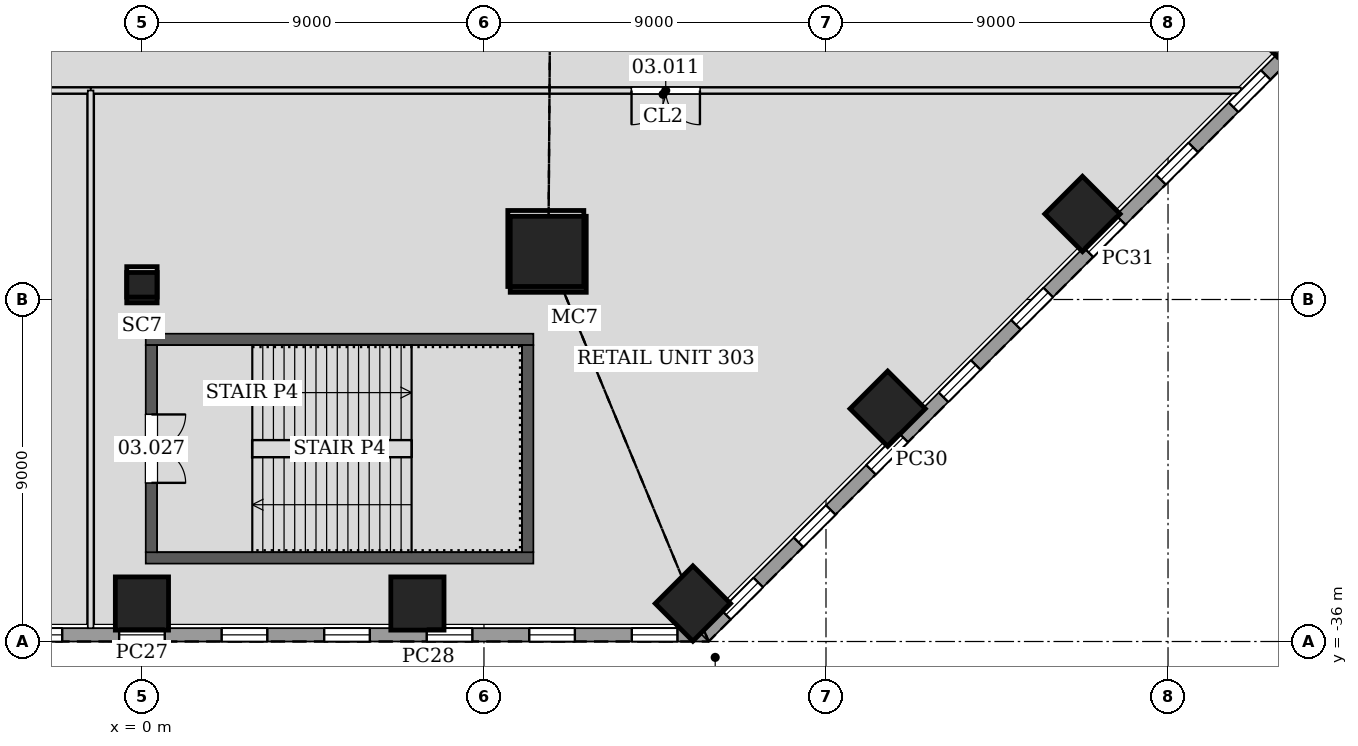
"""IFC4 building model, lengths in metres.
Left out: names, types, materials, properties, quantities, classifications, styles, units other than length and angle.
Written with IfcOpenShell. Run it as: python <this file> out.ifc"""

import sys

from ifc_helpers import new_model, si_unit, direction, frame, frame_2d, origin, origin_2d, place, context, subcontext, project, spatial, rectangle, hollow_rectangle, extrude, element, fill, save


model = new_model("IFC4")
c1 = context("Model", 3, precision=1e-05, world=origin(), true_north=direction((0.0, 1.0)))
c2 = subcontext(c1, "Body", "Model", "MODEL_VIEW")
j1 = project(units=[si_unit("LENGTHUNIT", "METRE"), si_unit("PLANEANGLEUNIT", "RADIAN")], contexts=[c1])
p1 = place(None, origin())
s1 = spatial("IfcSite", under=j1, at=p1, CompositionType="ELEMENT")
p2 = place(p1, origin())
s2 = spatial("IfcBuilding", under=s1, at=p2, CompositionType="ELEMENT")
p3 = place(p2, frame((0.0, 0.0, 18.6)))
s3 = spatial("IfcBuildingStorey", under=s2, at=p3, CompositionType="ELEMENT", Elevation=18.6)
p4 = place(p3, frame((10.691, -25.81, 0.0), z_axis=(-0.011704430453, 0.028289472832, 0.999531246152), x_axis=(-0.92403481427, -0.3823083337, 0.0)))
e1 = element("IfcColumn", 1, at=p4, inside=s3, PredefinedType="COLUMN", context=c2, shape_type="SweptSolid", body=[
    extrude(hollow_rectangle(XDim=2.0, YDim=2.0, WallThickness=0.09, at=origin_2d()), origin(), (0.0, 0.0, 1.0), 5.402),
])
p5 = place(p3, frame((0.0, -26.688, 0.0), z_axis=(0.0, 0.02824625291, 0.999600994996), x_axis=(-1.0, 0.0, 0.0)))
e2 = element("IfcColumn", 2, at=p5, inside=s3, PredefinedType="COLUMN", context=c2, shape_type="SweptSolid", body=[
    extrude(hollow_rectangle(XDim=0.8, YDim=0.8, WallThickness=0.05, at=origin_2d()), origin(), (0.0, 0.0, 1.0), 5.402),
])
for number, where, z_axis, x_axis in (
    (3, (0.0, -35.0, 0.0), (0.0, 0.0, 1.0), (1.0, 0.0, 0.0)),
    (4, (7.249, -35.0, 0.0), (0.0, 0.0, 1.0), (1.0, 0.0, 0.0)),
    (5, (14.498, -35.0, 0.0), (0.0, 0.0, 1.0), (0.707, 0.707, 0.0)),
    (6, (19.623, -29.874, 0.0), (0.0, 0.0, 1.0), (0.707, 0.707, 0.0)),
    (7, (24.749, -24.749, 0.0), (0.0, 0.0, 1.0), (0.707, 0.707, 0.0)),
    (8, (29.874, -19.623, 0.0), (0.0, 0.0, 1.0), (0.707, 0.707, 0.0)),
):
    element("IfcColumn", number, at=place(p3, frame(where, z_axis=z_axis, x_axis=x_axis)), inside=s3, PredefinedType="COLUMN", context=c2, shape_type="SweptSolid", body=[
        extrude(rectangle(XDim=1.4, YDim=1.4, at=origin_2d()), origin(), (0.0, 0.0, 1.0), 5.4),
    ])
for number, where, z_axis, x_axis in (
    (9, (0.1, -33.8, 0.0), (0.0, 0.0, 1.0), (1.0, 0.0, 0.0)),
    (10, (10.3, -28.05, 0.0), (0.0, 0.0, 1.0), (-1.0, 0.0, 0.0)),
):
    element("IfcWall", number, at=place(p3, frame(where, z_axis=z_axis, x_axis=x_axis)), inside=s3, PredefinedType="SOLIDWALL", context=c2, shape_type="SweptSolid", body=[
        extrude(rectangle(XDim=10.2, YDim=0.3, at=frame_2d((5.1, 0.0))), origin(), (0.0, 0.0, 1.0), 5.4),
    ])
p6 = place(p3, frame((0.25, -28.2, 0.0), z_axis=(0.0, 0.0, 1.0), x_axis=(0.0, -1.0, 0.0)))
e11 = element("IfcWall", 11, at=p6, inside=s3, PredefinedType="SOLIDWALL", context=c2, shape_type="SweptSolid", body=[
    extrude(rectangle(XDim=5.45, YDim=0.3, at=frame_2d((2.725, 0.0))), origin(), (0.0, 0.0, 1.0), 5.4),
])
p7 = place(p6, frame((1.825, 0.0, 0.0)))
e12 = element("IfcOpeningElement", 12, at=p7, cuts=e11, PredefinedType="OPENING", context=c2, shape_type="SweptSolid", body=[
    extrude(rectangle(XDim=1.8, YDim=2.1, at=frame_2d((0.9, 1.05))), frame((0.0, 0.16, 0.0), z_axis=(0.0, -1.0, 0.0), x_axis=(1.0, 0.0, 0.0)), (0.0, 0.0, 1.0), 0.32),
])
p8 = place(p3, frame((10.15, -33.65, 0.0), z_axis=(0.0, 0.0, 1.0), x_axis=(0.0, 1.0, 0.0)))
e13 = element("IfcWall", 13, at=p8, inside=s3, PredefinedType="SOLIDWALL", context=c2, shape_type="SweptSolid", body=[
    extrude(rectangle(XDim=5.45, YDim=0.3, at=frame_2d((2.725, 0.0))), origin(), (0.0, 0.0, 1.0), 5.4),
])
p9 = place(p3, frame((-14.912, -35.825, 0.0), z_axis=(0.0, 0.0, 1.0), x_axis=(1.0, 0.0, 0.0)))
e14 = element("IfcWall", 14, at=p9, inside=s3, PredefinedType="SOLIDWALL", context=c2, shape_type="SweptSolid", body=[
    extrude(rectangle(XDim=29.823, YDim=0.35, at=frame_2d((14.912, 0.0))), origin(), (0.0, 0.0, 1.0), 5.1),
])
p10 = place(p9, frame((0.822, 0.0, 0.9)))
e15 = element("IfcOpeningElement", 15, at=p10, cuts=e14, PredefinedType="OPENING", context=c2, shape_type="SweptSolid", body=[
    extrude(rectangle(XDim=1.2, YDim=3.6, at=frame_2d((0.6, 1.8))), frame((0.0, 0.185, 0.0), z_axis=(0.0, -1.0, 0.0), x_axis=(1.0, 0.0, 0.0)), (0.0, 0.0, 1.0), 0.37),
])
p11 = place(p9, frame((3.52, 0.0, 0.9)))
e16 = element("IfcOpeningElement", 16, at=p11, cuts=e14, PredefinedType="OPENING", context=c2, shape_type="SweptSolid", body=[
    extrude(rectangle(XDim=1.2, YDim=3.6, at=frame_2d((0.6, 1.8))), frame((0.0, 0.185, 0.0), z_axis=(0.0, -1.0, 0.0), x_axis=(1.0, 0.0, 0.0)), (0.0, 0.0, 1.0), 0.37),
])
p12 = place(p9, frame((6.218, 0.0, 0.9)))
e17 = element("IfcOpeningElement", 17, at=p12, cuts=e14, PredefinedType="OPENING", context=c2, shape_type="SweptSolid", body=[
    extrude(rectangle(XDim=1.2, YDim=3.6, at=frame_2d((0.6, 1.8))), frame((0.0, 0.185, 0.0), z_axis=(0.0, -1.0, 0.0), x_axis=(1.0, 0.0, 0.0)), (0.0, 0.0, 1.0), 0.37),
])
p13 = place(p9, frame((8.916, 0.0, 0.9)))
e18 = element("IfcOpeningElement", 18, at=p13, cuts=e14, PredefinedType="OPENING", context=c2, shape_type="SweptSolid", body=[
    extrude(rectangle(XDim=1.2, YDim=3.6, at=frame_2d((0.6, 1.8))), frame((0.0, 0.185, 0.0), z_axis=(0.0, -1.0, 0.0), x_axis=(1.0, 0.0, 0.0)), (0.0, 0.0, 1.0), 0.37),
])
p14 = place(p9, frame((11.614, 0.0, 0.9)))
e19 = element("IfcOpeningElement", 19, at=p14, cuts=e14, PredefinedType="OPENING", context=c2, shape_type="SweptSolid", body=[
    extrude(rectangle(XDim=1.2, YDim=3.6, at=frame_2d((0.6, 1.8))), frame((0.0, 0.185, 0.0), z_axis=(0.0, -1.0, 0.0), x_axis=(1.0, 0.0, 0.0)), (0.0, 0.0, 1.0), 0.37),
])
p15 = place(p9, frame((14.312, 0.0, 0.9)))
e20 = element("IfcOpeningElement", 20, at=p15, cuts=e14, PredefinedType="OPENING", context=c2, shape_type="SweptSolid", body=[
    extrude(rectangle(XDim=1.2, YDim=3.6, at=frame_2d((0.6, 1.8))), frame((0.0, 0.185, 0.0), z_axis=(0.0, -1.0, 0.0), x_axis=(1.0, 0.0, 0.0)), (0.0, 0.0, 1.0), 0.37),
])
p16 = place(p9, frame((17.01, 0.0, 0.9)))
e21 = element("IfcOpeningElement", 21, at=p16, cuts=e14, PredefinedType="OPENING", context=c2, shape_type="SweptSolid", body=[
    extrude(rectangle(XDim=1.2, YDim=3.6, at=frame_2d((0.6, 1.8))), frame((0.0, 0.185, 0.0), z_axis=(0.0, -1.0, 0.0), x_axis=(1.0, 0.0, 0.0)), (0.0, 0.0, 1.0), 0.37),
])
p17 = place(p9, frame((19.708, 0.0, 0.9)))
e22 = element("IfcOpeningElement", 22, at=p17, cuts=e14, PredefinedType="OPENING", context=c2, shape_type="SweptSolid", body=[
    extrude(rectangle(XDim=1.2, YDim=3.6, at=frame_2d((0.6, 1.8))), frame((0.0, 0.185, 0.0), z_axis=(0.0, -1.0, 0.0), x_axis=(1.0, 0.0, 0.0)), (0.0, 0.0, 1.0), 0.37),
])
p18 = place(p9, frame((22.406, 0.0, 0.9)))
e23 = element("IfcOpeningElement", 23, at=p18, cuts=e14, PredefinedType="OPENING", context=c2, shape_type="SweptSolid", body=[
    extrude(rectangle(XDim=1.2, YDim=3.6, at=frame_2d((0.6, 1.8))), frame((0.0, 0.185, 0.0), z_axis=(0.0, -1.0, 0.0), x_axis=(1.0, 0.0, 0.0)), (0.0, 0.0, 1.0), 0.37),
])
p19 = place(p9, frame((25.104, 0.0, 0.9)))
e24 = element("IfcOpeningElement", 24, at=p19, cuts=e14, PredefinedType="OPENING", context=c2, shape_type="SweptSolid", body=[
    extrude(rectangle(XDim=1.2, YDim=3.6, at=frame_2d((0.6, 1.8))), frame((0.0, 0.185, 0.0), z_axis=(0.0, -1.0, 0.0), x_axis=(1.0, 0.0, 0.0)), (0.0, 0.0, 1.0), 0.37),
])
p20 = place(p9, frame((27.802, 0.0, 0.9)))
e25 = element("IfcOpeningElement", 25, at=p20, cuts=e14, PredefinedType="OPENING", context=c2, shape_type="SweptSolid", body=[
    extrude(rectangle(XDim=1.2, YDim=3.6, at=frame_2d((0.6, 1.8))), frame((0.0, 0.185, 0.0), z_axis=(0.0, -1.0, 0.0), x_axis=(1.0, 0.0, 0.0)), (0.0, 0.0, 1.0), 0.37),
])
p21 = place(p3, frame((14.788, -35.876, 0.0), z_axis=(0.0, 0.0, 1.0), x_axis=(0.707106781187, 0.707106781187, 0.0)))
e26 = element("IfcWall", 26, at=p21, inside=s3, PredefinedType="SOLIDWALL", context=c2, shape_type="SweptSolid", body=[
    extrude(rectangle(XDim=29.823, YDim=0.35, at=frame_2d((14.912, 0.0))), origin(), (0.0, 0.0, 1.0), 5.1),
])
p22 = place(p21, frame((0.822, 0.0, 0.9)))
e27 = element("IfcOpeningElement", 27, at=p22, cuts=e26, PredefinedType="OPENING", context=c2, shape_type="SweptSolid", body=[
    extrude(rectangle(XDim=1.2, YDim=3.6, at=frame_2d((0.6, 1.8))), frame((0.0, 0.185, 0.0), z_axis=(0.0, -1.0, 0.0), x_axis=(1.0, 0.0, 0.0)), (0.0, 0.0, 1.0), 0.37),
])
p23 = place(p21, frame((3.52, 0.0, 0.9)))
e28 = element("IfcOpeningElement", 28, at=p23, cuts=e26, PredefinedType="OPENING", context=c2, shape_type="SweptSolid", body=[
    extrude(rectangle(XDim=1.2, YDim=3.6, at=frame_2d((0.6, 1.8))), frame((0.0, 0.185, 0.0), z_axis=(0.0, -1.0, 0.0), x_axis=(1.0, 0.0, 0.0)), (0.0, 0.0, 1.0), 0.37),
])
p24 = place(p21, frame((6.218, 0.0, 0.9)))
e29 = element("IfcOpeningElement", 29, at=p24, cuts=e26, PredefinedType="OPENING", context=c2, shape_type="SweptSolid", body=[
    extrude(rectangle(XDim=1.2, YDim=3.6, at=frame_2d((0.6, 1.8))), frame((0.0, 0.185, 0.0), z_axis=(0.0, -1.0, 0.0), x_axis=(1.0, 0.0, 0.0)), (0.0, 0.0, 1.0), 0.37),
])
p25 = place(p21, frame((8.916, 0.0, 0.9)))
e30 = element("IfcOpeningElement", 30, at=p25, cuts=e26, PredefinedType="OPENING", context=c2, shape_type="SweptSolid", body=[
    extrude(rectangle(XDim=1.2, YDim=3.6, at=frame_2d((0.6, 1.8))), frame((0.0, 0.185, 0.0), z_axis=(0.0, -1.0, 0.0), x_axis=(1.0, 0.0, 0.0)), (0.0, 0.0, 1.0), 0.37),
])
p26 = place(p21, frame((11.614, 0.0, 0.9)))
e31 = element("IfcOpeningElement", 31, at=p26, cuts=e26, PredefinedType="OPENING", context=c2, shape_type="SweptSolid", body=[
    extrude(rectangle(XDim=1.2, YDim=3.6, at=frame_2d((0.6, 1.8))), frame((0.0, 0.185, 0.0), z_axis=(0.0, -1.0, 0.0), x_axis=(1.0, 0.0, 0.0)), (0.0, 0.0, 1.0), 0.37),
])
p27 = place(p21, frame((14.312, 0.0, 0.9)))
e32 = element("IfcOpeningElement", 32, at=p27, cuts=e26, PredefinedType="OPENING", context=c2, shape_type="SweptSolid", body=[
    extrude(rectangle(XDim=1.2, YDim=3.6, at=frame_2d((0.6, 1.8))), frame((0.0, 0.185, 0.0), z_axis=(0.0, -1.0, 0.0), x_axis=(1.0, 0.0, 0.0)), (0.0, 0.0, 1.0), 0.37),
])
p28 = place(p21, frame((17.01, 0.0, 0.9)))
e33 = element("IfcOpeningElement", 33, at=p28, cuts=e26, PredefinedType="OPENING", context=c2, shape_type="SweptSolid", body=[
    extrude(rectangle(XDim=1.2, YDim=3.6, at=frame_2d((0.6, 1.8))), frame((0.0, 0.185, 0.0), z_axis=(0.0, -1.0, 0.0), x_axis=(1.0, 0.0, 0.0)), (0.0, 0.0, 1.0), 0.37),
])
p29 = place(p21, frame((19.708, 0.0, 0.9)))
e34 = element("IfcOpeningElement", 34, at=p29, cuts=e26, PredefinedType="OPENING", context=c2, shape_type="SweptSolid", body=[
    extrude(rectangle(XDim=1.2, YDim=3.6, at=frame_2d((0.6, 1.8))), frame((0.0, 0.185, 0.0), z_axis=(0.0, -1.0, 0.0), x_axis=(1.0, 0.0, 0.0)), (0.0, 0.0, 1.0), 0.37),
])
p30 = place(p21, frame((22.406, 0.0, 0.9)))
e35 = element("IfcOpeningElement", 35, at=p30, cuts=e26, PredefinedType="OPENING", context=c2, shape_type="SweptSolid", body=[
    extrude(rectangle(XDim=1.2, YDim=3.6, at=frame_2d((0.6, 1.8))), frame((0.0, 0.185, 0.0), z_axis=(0.0, -1.0, 0.0), x_axis=(1.0, 0.0, 0.0)), (0.0, 0.0, 1.0), 0.37),
])
p31 = place(p21, frame((25.104, 0.0, 0.9)))
e36 = element("IfcOpeningElement", 36, at=p31, cuts=e26, PredefinedType="OPENING", context=c2, shape_type="SweptSolid", body=[
    extrude(rectangle(XDim=1.2, YDim=3.6, at=frame_2d((0.6, 1.8))), frame((0.0, 0.185, 0.0), z_axis=(0.0, -1.0, 0.0), x_axis=(1.0, 0.0, 0.0)), (0.0, 0.0, 1.0), 0.37),
])
p32 = place(p21, frame((27.802, 0.0, 0.9)))
e37 = element("IfcOpeningElement", 37, at=p32, cuts=e26, PredefinedType="OPENING", context=c2, shape_type="SweptSolid", body=[
    extrude(rectangle(XDim=1.2, YDim=3.6, at=frame_2d((0.6, 1.8))), frame((0.0, 0.185, 0.0), z_axis=(0.0, -1.0, 0.0), x_axis=(1.0, 0.0, 0.0)), (0.0, 0.0, 1.0), 0.37),
])
p33 = place(p3, frame((-1.351, -21.5, 0.0), z_axis=(0.0, 0.0, 1.0), x_axis=(1.0, 0.0, 0.0)))
e38 = element("IfcWall", 38, at=p33, inside=s3, PredefinedType="PARTITIONING", context=c2, shape_type="SweptSolid", body=[
    extrude(rectangle(XDim=30.268, YDim=0.15, at=frame_2d((15.134, 0.0))), origin(), (0.0, 0.0, 1.0), 3.79),
])
p34 = place(p33, frame((14.234, 0.0, 0.0)))
e39 = element("IfcOpeningElement", 39, at=p34, cuts=e38, PredefinedType="OPENING", context=c2, shape_type="SweptSolid", body=[
    extrude(rectangle(XDim=1.8, YDim=2.4, at=frame_2d((0.9, 1.2))), frame((0.0, 0.085, 0.0), z_axis=(0.0, -1.0, 0.0), x_axis=(1.0, 0.0, 0.0)), (0.0, 0.0, 1.0), 0.17),
])
p35 = place(p3, frame((-28.917, -21.5, 0.0), z_axis=(0.0, 0.0, 1.0), x_axis=(1.0, 0.0, 0.0)))
e40 = element("IfcWall", 40, at=p35, inside=s3, PredefinedType="PARTITIONING", context=c2, shape_type="SweptSolid", body=[
    extrude(rectangle(XDim=27.568, YDim=0.15, at=frame_2d((13.784, 0.0))), origin(), (0.0, 0.0, 1.0), 3.79),
])
p36 = place(p35, frame((12.884, 0.0, 0.0)))
e41 = element("IfcOpeningElement", 41, at=p36, cuts=e40, PredefinedType="OPENING", context=c2, shape_type="SweptSolid", body=[
    extrude(rectangle(XDim=1.8, YDim=2.4, at=frame_2d((0.9, 1.2))), frame((0.0, 0.085, 0.0), z_axis=(0.0, -1.0, 0.0), x_axis=(1.0, 0.0, 0.0)), (0.0, 0.0, 1.0), 0.17),
])
p37 = place(p3, frame((-1.35, -21.5, 0.0), z_axis=(0.0, 0.0, 1.0), x_axis=(0.0, -1.0, 0.0)))
e42 = element("IfcWall", 42, at=p37, inside=s3, PredefinedType="PARTITIONING", context=c2, shape_type="SweptSolid", body=[
    extrude(rectangle(XDim=14.15, YDim=0.15, at=frame_2d((7.075, 0.0))), origin(), (0.0, 0.0, 1.0), 4.163),
])
p38 = place(p14, origin())
e43 = element("IfcWindow", 43, at=p38, inside=s3, PartitioningType="SINGLE_PANEL", PredefinedType="WINDOW", context=c2, shape_type="SweptSolid", body=[
    extrude(rectangle(XDim=1.2, YDim=3.6, at=frame_2d((0.6, 1.8))), frame((0.0, 0.03, 0.0), z_axis=(0.0, -1.0, 0.0), x_axis=(1.0, 0.0, 0.0)), (0.0, 0.0, 1.0), 0.06),
])
fill(e19, e43)
p39 = place(p15, origin())
e44 = element("IfcWindow", 44, at=p39, inside=s3, PartitioningType="SINGLE_PANEL", PredefinedType="WINDOW", context=c2, shape_type="SweptSolid", body=[
    extrude(rectangle(XDim=1.2, YDim=3.6, at=frame_2d((0.6, 1.8))), frame((0.0, 0.03, 0.0), z_axis=(0.0, -1.0, 0.0), x_axis=(1.0, 0.0, 0.0)), (0.0, 0.0, 1.0), 0.06),
])
fill(e20, e44)
p40 = place(p16, origin())
e45 = element("IfcWindow", 45, at=p40, inside=s3, PartitioningType="SINGLE_PANEL", PredefinedType="WINDOW", context=c2, shape_type="SweptSolid", body=[
    extrude(rectangle(XDim=1.2, YDim=3.6, at=frame_2d((0.6, 1.8))), frame((0.0, 0.03, 0.0), z_axis=(0.0, -1.0, 0.0), x_axis=(1.0, 0.0, 0.0)), (0.0, 0.0, 1.0), 0.06),
])
fill(e21, e45)
p41 = place(p17, origin())
e46 = element("IfcWindow", 46, at=p41, inside=s3, PartitioningType="SINGLE_PANEL", PredefinedType="WINDOW", context=c2, shape_type="SweptSolid", body=[
    extrude(rectangle(XDim=1.2, YDim=3.6, at=frame_2d((0.6, 1.8))), frame((0.0, 0.03, 0.0), z_axis=(0.0, -1.0, 0.0), x_axis=(1.0, 0.0, 0.0)), (0.0, 0.0, 1.0), 0.06),
])
fill(e22, e46)
p42 = place(p18, origin())
e47 = element("IfcWindow", 47, at=p42, inside=s3, PartitioningType="SINGLE_PANEL", PredefinedType="WINDOW", context=c2, shape_type="SweptSolid", body=[
    extrude(rectangle(XDim=1.2, YDim=3.6, at=frame_2d((0.6, 1.8))), frame((0.0, 0.03, 0.0), z_axis=(0.0, -1.0, 0.0), x_axis=(1.0, 0.0, 0.0)), (0.0, 0.0, 1.0), 0.06),
])
fill(e23, e47)
p43 = place(p19, origin())
e48 = element("IfcWindow", 48, at=p43, inside=s3, PartitioningType="SINGLE_PANEL", PredefinedType="WINDOW", context=c2, shape_type="SweptSolid", body=[
    extrude(rectangle(XDim=1.2, YDim=3.6, at=frame_2d((0.6, 1.8))), frame((0.0, 0.03, 0.0), z_axis=(0.0, -1.0, 0.0), x_axis=(1.0, 0.0, 0.0)), (0.0, 0.0, 1.0), 0.06),
])
fill(e24, e48)
p44 = place(p20, origin())
e49 = element("IfcWindow", 49, at=p44, inside=s3, PartitioningType="SINGLE_PANEL", PredefinedType="WINDOW", context=c2, shape_type="SweptSolid", body=[
    extrude(rectangle(XDim=1.2, YDim=3.6, at=frame_2d((0.6, 1.8))), frame((0.0, 0.03, 0.0), z_axis=(0.0, -1.0, 0.0), x_axis=(1.0, 0.0, 0.0)), (0.0, 0.0, 1.0), 0.06),
])
fill(e25, e49)
p45 = place(p22, origin())
e50 = element("IfcWindow", 50, at=p45, inside=s3, PartitioningType="SINGLE_PANEL", PredefinedType="WINDOW", context=c2, shape_type="SweptSolid", body=[
    extrude(rectangle(XDim=1.2, YDim=3.6, at=frame_2d((0.6, 1.8))), frame((0.0, 0.03, 0.0), z_axis=(0.0, -1.0, 0.0), x_axis=(1.0, 0.0, 0.0)), (0.0, 0.0, 1.0), 0.06),
])
fill(e27, e50)
p46 = place(p23, origin())
e51 = element("IfcWindow", 51, at=p46, inside=s3, PartitioningType="SINGLE_PANEL", PredefinedType="WINDOW", context=c2, shape_type="SweptSolid", body=[
    extrude(rectangle(XDim=1.2, YDim=3.6, at=frame_2d((0.6, 1.8))), frame((0.0, 0.03, 0.0), z_axis=(0.0, -1.0, 0.0), x_axis=(1.0, 0.0, 0.0)), (0.0, 0.0, 1.0), 0.06),
])
fill(e28, e51)
p47 = place(p24, origin())
e52 = element("IfcWindow", 52, at=p47, inside=s3, PartitioningType="SINGLE_PANEL", PredefinedType="WINDOW", context=c2, shape_type="SweptSolid", body=[
    extrude(rectangle(XDim=1.2, YDim=3.6, at=frame_2d((0.6, 1.8))), frame((0.0, 0.03, 0.0), z_axis=(0.0, -1.0, 0.0), x_axis=(1.0, 0.0, 0.0)), (0.0, 0.0, 1.0), 0.06),
])
fill(e29, e52)
p48 = place(p25, origin())
e53 = element("IfcWindow", 53, at=p48, inside=s3, PartitioningType="SINGLE_PANEL", PredefinedType="WINDOW", context=c2, shape_type="SweptSolid", body=[
    extrude(rectangle(XDim=1.2, YDim=3.6, at=frame_2d((0.6, 1.8))), frame((0.0, 0.03, 0.0), z_axis=(0.0, -1.0, 0.0), x_axis=(1.0, 0.0, 0.0)), (0.0, 0.0, 1.0), 0.06),
])
fill(e30, e53)
p49 = place(p26, origin())
e54 = element("IfcWindow", 54, at=p49, inside=s3, PartitioningType="SINGLE_PANEL", PredefinedType="WINDOW", context=c2, shape_type="SweptSolid", body=[
    extrude(rectangle(XDim=1.2, YDim=3.6, at=frame_2d((0.6, 1.8))), frame((0.0, 0.03, 0.0), z_axis=(0.0, -1.0, 0.0), x_axis=(1.0, 0.0, 0.0)), (0.0, 0.0, 1.0), 0.06),
])
fill(e31, e54)
p50 = place(p27, origin())
e55 = element("IfcWindow", 55, at=p50, inside=s3, PartitioningType="SINGLE_PANEL", PredefinedType="WINDOW", context=c2, shape_type="SweptSolid", body=[
    extrude(rectangle(XDim=1.2, YDim=3.6, at=frame_2d((0.6, 1.8))), frame((0.0, 0.03, 0.0), z_axis=(0.0, -1.0, 0.0), x_axis=(1.0, 0.0, 0.0)), (0.0, 0.0, 1.0), 0.06),
])
fill(e32, e55)
p51 = place(p28, origin())
e56 = element("IfcWindow", 56, at=p51, inside=s3, PartitioningType="SINGLE_PANEL", PredefinedType="WINDOW", context=c2, shape_type="SweptSolid", body=[
    extrude(rectangle(XDim=1.2, YDim=3.6, at=frame_2d((0.6, 1.8))), frame((0.0, 0.03, 0.0), z_axis=(0.0, -1.0, 0.0), x_axis=(1.0, 0.0, 0.0)), (0.0, 0.0, 1.0), 0.06),
])
fill(e33, e56)
p52 = place(p29, origin())
e57 = element("IfcWindow", 57, at=p52, inside=s3, PartitioningType="SINGLE_PANEL", PredefinedType="WINDOW", context=c2, shape_type="SweptSolid", body=[
    extrude(rectangle(XDim=1.2, YDim=3.6, at=frame_2d((0.6, 1.8))), frame((0.0, 0.03, 0.0), z_axis=(0.0, -1.0, 0.0), x_axis=(1.0, 0.0, 0.0)), (0.0, 0.0, 1.0), 0.06),
])
fill(e34, e57)
p53 = place(p34, frame((1.8, 0.0, 0.0), z_axis=(0.0, 0.0, 1.0), x_axis=(-1.0, 0.0, 0.0)))
e58 = element("IfcDoor", 58, at=p53, inside=s3, OperationType="DOUBLE_DOOR_SINGLE_SWING", PredefinedType="DOOR", context=c2, shape_type="SweptSolid", body=[
    extrude(rectangle(XDim=1.8, YDim=2.4, at=frame_2d((0.9, 1.2))), frame((0.0, 0.025, 0.0), z_axis=(0.0, -1.0, 0.0), x_axis=(1.0, 0.0, 0.0)), (0.0, 0.0, 1.0), 0.05),
])
fill(e39, e58)
p54 = place(p7, origin())
e59 = element("IfcDoor", 59, at=p54, inside=s3, OperationType="DOUBLE_DOOR_SINGLE_SWING", PredefinedType="DOOR", context=c2, shape_type="SweptSolid", body=[
    extrude(rectangle(XDim=1.8, YDim=2.1, at=frame_2d((0.9, 1.05))), frame((0.0, 0.025, 0.0), z_axis=(0.0, -1.0, 0.0), x_axis=(1.0, 0.0, 0.0)), (0.0, 0.0, 1.0), 0.05),
])
fill(e12, e59)
save(model, sys.argv[1])
